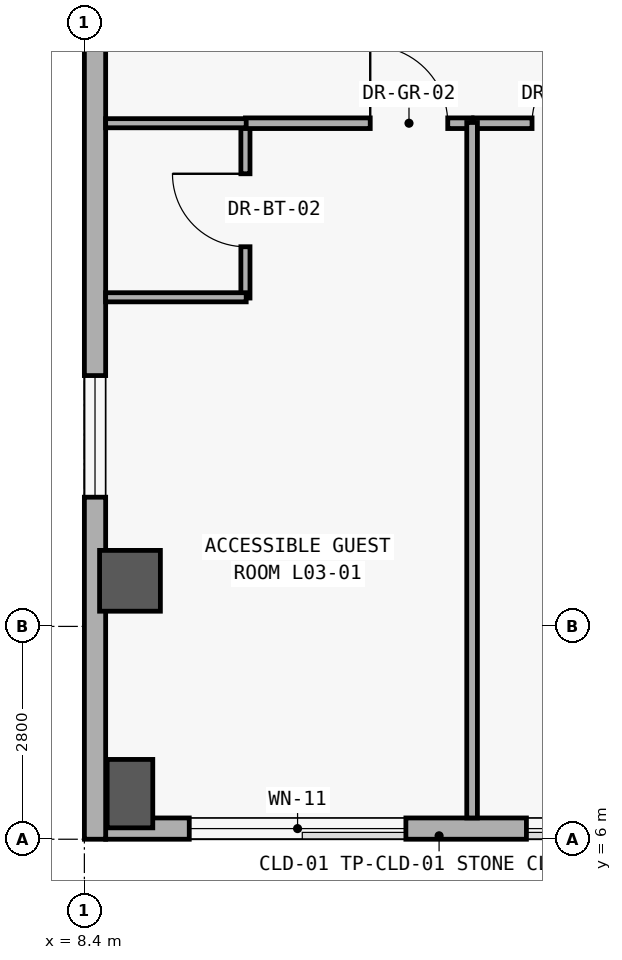
"""IFC4 building model, lengths in metres.
Left out: names, types, materials, properties, quantities, classifications, styles, units other than length and angle.
Written with IfcOpenShell. Run it as: python <this file> out.ifc"""

import sys

from ifc_helpers import new_model, si_unit, direction, frame, frame_2d, origin, origin_2d, place, context, subcontext, project, spatial, rectangle, extrude, element, fill, save


model = new_model("IFC4")
c1 = context("Model", 3, precision=1e-05, world=origin(), true_north=direction((0.0, 1.0)))
c2 = subcontext(c1, "Body", "Model", "MODEL_VIEW")
j1 = project(units=[si_unit("LENGTHUNIT", "METRE"), si_unit("PLANEANGLEUNIT", "RADIAN")], contexts=[c1])
p1 = place(None, origin())
s1 = spatial("IfcSite", under=j1, at=p1, CompositionType="ELEMENT")
p2 = place(p1, origin())
s2 = spatial("IfcBuilding", under=s1, at=p2, CompositionType="ELEMENT")
p3 = place(p2, frame((0.0, 0.0, 15.0)))
s3 = spatial("IfcBuildingStorey", under=s2, at=p3, CompositionType="ELEMENT", Elevation=15.0)
p4 = place(p3, frame((9.0, 6.6, 0.0), z_axis=(0.0, 0.0, 1.0), x_axis=(0.0, 1.0, 0.0)))
e1 = element("IfcColumn", 1, at=p4, inside=s3, PredefinedType="COLUMN", context=c2, shape_type="SweptSolid", body=[
    extrude(rectangle(XDim=0.6, YDim=0.9, at=origin_2d()), origin(), (0.0, 0.0, 1.0), 4.2),
])
p5 = place(p3, frame((9.0, 9.4, 0.0), z_axis=(0.0, 0.0, 1.0), x_axis=(1.0, 0.0, 0.0)))
e2 = element("IfcColumn", 2, at=p5, inside=s3, PredefinedType="COLUMN", context=c2, shape_type="SweptSolid", body=[
    extrude(rectangle(XDim=0.8, YDim=0.8, at=origin_2d()), origin(), (0.0, 0.0, 1.0), 4.2),
])
p6 = place(p3, frame((92.12, 6.14, 0.0), z_axis=(0.0, 0.0, 1.0), x_axis=(-1.0, 0.0, 0.0)))
e3 = element("IfcWall", 3, at=p6, inside=s3, PredefinedType="SOLIDWALL", context=c2, shape_type="SweptSolid", body=[
    extrude(rectangle(XDim=83.44, YDim=0.28, at=frame_2d((41.72, 0.0))), origin(), (0.0, 0.0, 1.0), 3.92),
])
p7 = place(p6, frame((79.49, 0.0, 0.85)))
e4 = element("IfcOpeningElement", 4, at=p7, cuts=e3, PredefinedType="OPENING", context=c2, shape_type="SweptSolid", body=[
    extrude(rectangle(XDim=2.85, YDim=1.85, at=frame_2d((1.425, 0.925))), frame((0.0, 0.15, 0.0), z_axis=(0.0, -1.0, 0.0), x_axis=(1.0, 0.0, 0.0)), (0.0, 0.0, 1.0), 0.3),
])
p8 = place(p6, frame((74.704, 0.0, 0.85)))
e5 = element("IfcOpeningElement", 5, at=p8, cuts=e3, PredefinedType="OPENING", context=c2, shape_type="SweptSolid", body=[
    extrude(rectangle(XDim=3.2, YDim=1.95, at=frame_2d((1.6, 0.975))), frame((0.0, 0.15, 0.0), z_axis=(0.0, -1.0, 0.0), x_axis=(1.0, 0.0, 0.0)), (0.0, 0.0, 1.0), 0.3),
])
p9 = place(p6, frame((69.942, 0.0, 0.85)))
e6 = element("IfcOpeningElement", 6, at=p9, cuts=e3, PredefinedType="OPENING", context=c2, shape_type="SweptSolid", body=[
    extrude(rectangle(XDim=3.5, YDim=2.0, at=frame_2d((1.75, 1.0))), frame((0.0, 0.15, 0.0), z_axis=(0.0, -1.0, 0.0), x_axis=(1.0, 0.0, 0.0)), (0.0, 0.0, 1.0), 0.3),
])
p10 = place(p6, frame((66.382, 0.0, 0.85)))
e7 = element("IfcOpeningElement", 7, at=p10, cuts=e3, PredefinedType="OPENING", context=c2, shape_type="SweptSolid", body=[
    extrude(rectangle(XDim=1.4, YDim=1.6, at=frame_2d((0.7, 0.8))), frame((0.0, 0.15, 0.0), z_axis=(0.0, -1.0, 0.0), x_axis=(1.0, 0.0, 0.0)), (0.0, 0.0, 1.0), 0.3),
])
p11 = place(p6, frame((61.67, 0.0, 0.85)))
e8 = element("IfcOpeningElement", 8, at=p11, cuts=e3, PredefinedType="OPENING", context=c2, shape_type="SweptSolid", body=[
    extrude(rectangle(XDim=1.6, YDim=1.6, at=frame_2d((0.8, 0.8))), frame((0.0, 0.15, 0.0), z_axis=(0.0, -1.0, 0.0), x_axis=(1.0, 0.0, 0.0)), (0.0, 0.0, 1.0), 0.3),
])
p12 = place(p6, frame((56.959, 0.0, 0.85)))
e9 = element("IfcOpeningElement", 9, at=p12, cuts=e3, PredefinedType="OPENING", context=c2, shape_type="SweptSolid", body=[
    extrude(rectangle(XDim=1.8, YDim=1.6, at=frame_2d((0.9, 0.8))), frame((0.0, 0.15, 0.0), z_axis=(0.0, -1.0, 0.0), x_axis=(1.0, 0.0, 0.0)), (0.0, 0.0, 1.0), 0.3),
])
p13 = place(p6, frame((52.248, 0.0, 0.85)))
e10 = element("IfcOpeningElement", 10, at=p13, cuts=e3, PredefinedType="OPENING", context=c2, shape_type="SweptSolid", body=[
    extrude(rectangle(XDim=2.0, YDim=1.65, at=frame_2d((1.0, 0.825))), frame((0.0, 0.15, 0.0), z_axis=(0.0, -1.0, 0.0), x_axis=(1.0, 0.0, 0.0)), (0.0, 0.0, 1.0), 0.3),
])
p14 = place(p6, frame((47.536, 0.0, 0.85)))
e11 = element("IfcOpeningElement", 11, at=p14, cuts=e3, PredefinedType="OPENING", context=c2, shape_type="SweptSolid", body=[
    extrude(rectangle(XDim=2.2, YDim=1.65, at=frame_2d((1.1, 0.825))), frame((0.0, 0.15, 0.0), z_axis=(0.0, -1.0, 0.0), x_axis=(1.0, 0.0, 0.0)), (0.0, 0.0, 1.0), 0.3),
])
p15 = place(p6, frame((42.726, 0.0, 0.85)))
e12 = element("IfcOpeningElement", 12, at=p15, cuts=e3, PredefinedType="OPENING", context=c2, shape_type="SweptSolid", body=[
    extrude(rectangle(XDim=2.6, YDim=2.2, at=frame_2d((1.3, 1.1))), frame((0.0, 0.15, 0.0), z_axis=(0.0, -1.0, 0.0), x_axis=(1.0, 0.0, 0.0)), (0.0, 0.0, 1.0), 0.3),
])
p16 = place(p6, frame((37.865, 0.0, 0.85)))
e13 = element("IfcOpeningElement", 13, at=p16, cuts=e3, PredefinedType="OPENING", context=c2, shape_type="SweptSolid", body=[
    extrude(rectangle(XDim=3.1, YDim=2.2, at=frame_2d((1.55, 1.1))), frame((0.0, 0.15, 0.0), z_axis=(0.0, -1.0, 0.0), x_axis=(1.0, 0.0, 0.0)), (0.0, 0.0, 1.0), 0.3),
])
p17 = place(p6, frame((33.004, 0.0, 0.85)))
e14 = element("IfcOpeningElement", 14, at=p17, cuts=e3, PredefinedType="OPENING", context=c2, shape_type="SweptSolid", body=[
    extrude(rectangle(XDim=3.6, YDim=2.3, at=frame_2d((1.8, 1.15))), frame((0.0, 0.15, 0.0), z_axis=(0.0, -1.0, 0.0), x_axis=(1.0, 0.0, 0.0)), (0.0, 0.0, 1.0), 0.3),
])
p18 = place(p6, frame((29.568, 0.0, 0.85)))
e15 = element("IfcOpeningElement", 15, at=p18, cuts=e3, PredefinedType="OPENING", context=c2, shape_type="SweptSolid", body=[
    extrude(rectangle(XDim=1.25, YDim=1.45, at=frame_2d((0.625, 0.725))), frame((0.0, 0.15, 0.0), z_axis=(0.0, -1.0, 0.0), x_axis=(1.0, 0.0, 0.0)), (0.0, 0.0, 1.0), 0.3),
])
p19 = place(p6, frame((24.907, 0.0, 0.85)))
e16 = element("IfcOpeningElement", 16, at=p19, cuts=e3, PredefinedType="OPENING", context=c2, shape_type="SweptSolid", body=[
    extrude(rectangle(XDim=1.35, YDim=1.55, at=frame_2d((0.675, 0.775))), frame((0.0, 0.15, 0.0), z_axis=(0.0, -1.0, 0.0), x_axis=(1.0, 0.0, 0.0)), (0.0, 0.0, 1.0), 0.3),
])
p20 = place(p6, frame((20.245, 0.0, 0.85)))
e17 = element("IfcOpeningElement", 17, at=p20, cuts=e3, PredefinedType="OPENING", context=c2, shape_type="SweptSolid", body=[
    extrude(rectangle(XDim=1.45, YDim=1.65, at=frame_2d((0.725, 0.825))), frame((0.0, 0.15, 0.0), z_axis=(0.0, -1.0, 0.0), x_axis=(1.0, 0.0, 0.0)), (0.0, 0.0, 1.0), 0.3),
])
p21 = place(p6, frame((15.584, 0.0, 0.85)))
e18 = element("IfcOpeningElement", 18, at=p21, cuts=e3, PredefinedType="OPENING", context=c2, shape_type="SweptSolid", body=[
    extrude(rectangle(XDim=1.55, YDim=1.65, at=frame_2d((0.775, 0.825))), frame((0.0, 0.15, 0.0), z_axis=(0.0, -1.0, 0.0), x_axis=(1.0, 0.0, 0.0)), (0.0, 0.0, 1.0), 0.3),
])
p22 = place(p6, frame((10.898, 0.0, 0.85)))
e19 = element("IfcOpeningElement", 19, at=p22, cuts=e3, PredefinedType="OPENING", context=c2, shape_type="SweptSolid", body=[
    extrude(rectangle(XDim=1.7, YDim=2.0, at=frame_2d((0.85, 1.0))), frame((0.0, 0.15, 0.0), z_axis=(0.0, -1.0, 0.0), x_axis=(1.0, 0.0, 0.0)), (0.0, 0.0, 1.0), 0.3),
])
p23 = place(p6, frame((5.987, 0.0, 0.85)))
e20 = element("IfcOpeningElement", 20, at=p23, cuts=e3, PredefinedType="OPENING", context=c2, shape_type="SweptSolid", body=[
    extrude(rectangle(XDim=2.3, YDim=2.05, at=frame_2d((1.15, 1.025))), frame((0.0, 0.15, 0.0), z_axis=(0.0, -1.0, 0.0), x_axis=(1.0, 0.0, 0.0)), (0.0, 0.0, 1.0), 0.3),
])
p24 = place(p6, frame((1.151, 0.0, 0.85)))
e21 = element("IfcOpeningElement", 21, at=p24, cuts=e3, PredefinedType="OPENING", context=c2, shape_type="SweptSolid", body=[
    extrude(rectangle(XDim=2.75, YDim=2.1, at=frame_2d((1.375, 1.05))), frame((0.0, 0.15, 0.0), z_axis=(0.0, -1.0, 0.0), x_axis=(1.0, 0.0, 0.0)), (0.0, 0.0, 1.0), 0.3),
])
p25 = place(p3, frame((8.54, 6.0, 0.0), z_axis=(0.0, 0.0, 1.0), x_axis=(0.0, 1.0, 0.0)))
e22 = element("IfcWall", 22, at=p25, inside=s3, PredefinedType="SOLIDWALL", context=c2, shape_type="SweptSolid", body=[
    extrude(rectangle(XDim=28.0, YDim=0.28, at=frame_2d((14.0, 0.0))), origin(), (0.0, 0.0, 1.0), 3.92),
])
p26 = place(p25, frame((4.5, 0.0, 0.95)))
e23 = element("IfcOpeningElement", 23, at=p26, cuts=e22, PredefinedType="OPENING", context=c2, shape_type="SweptSolid", body=[
    extrude(rectangle(XDim=1.6, YDim=1.6, at=frame_2d((0.8, 0.8))), frame((0.0, 0.15, 0.0), z_axis=(0.0, -1.0, 0.0), x_axis=(1.0, 0.0, 0.0)), (0.0, 0.0, 1.0), 0.3),
])
p27 = place(p3, frame((10.519, 13.12, 0.0), z_axis=(0.0, 0.0, 1.0), x_axis=(0.0, 1.0, 0.0)))
e24 = element("IfcWall", 24, at=p27, inside=s3, PredefinedType="PARTITIONING", context=c2, shape_type="SweptSolid", body=[
    extrude(rectangle(XDim=2.31, YDim=0.12, at=frame_2d((1.155, 0.0))), origin(), (0.0, 0.0, 1.0), 3.02),
])
p28 = place(p27, frame((0.675, 0.0, 0.0)))
e25 = element("IfcOpeningElement", 25, at=p28, cuts=e24, PredefinedType="OPENING", context=c2, shape_type="SweptSolid", body=[
    extrude(rectangle(XDim=0.96, YDim=2.15, at=frame_2d((0.48, 1.075))), frame((0.0, 0.07, 0.0), z_axis=(0.0, -1.0, 0.0), x_axis=(1.0, 0.0, 0.0)), (0.0, 0.0, 1.0), 0.14),
])
p29 = place(p3, frame((10.519, 15.42, 0.0), z_axis=(0.0, 0.0, 1.0), x_axis=(1.0, 0.0, 0.0)))
e26 = element("IfcWall", 26, at=p29, inside=s3, PredefinedType="PARTITIONING", context=c2, shape_type="SweptSolid", body=[
    extrude(rectangle(XDim=2.982, YDim=0.14, at=frame_2d((1.491, 0.0))), origin(), (0.0, 0.0, 1.0), 3.02),
])
p30 = place(p29, frame((1.642, 0.0, 0.0)))
e27 = element("IfcOpeningElement", 27, at=p30, cuts=e26, PredefinedType="OPENING", context=c2, shape_type="SweptSolid", body=[
    extrude(rectangle(XDim=1.02, YDim=2.2, at=frame_2d((0.51, 1.1))), frame((0.0, 0.08, 0.0), z_axis=(0.0, -1.0, 0.0), x_axis=(1.0, 0.0, 0.0)), (0.0, 0.0, 1.0), 0.16),
])
p31 = place(p3, frame((13.521, 15.42, 0.0), z_axis=(0.0, 0.0, 1.0), x_axis=(1.0, 0.0, 0.0)))
e28 = element("IfcWall", 28, at=p31, inside=s3, PredefinedType="PARTITIONING", context=c2, shape_type="SweptSolid", body=[
    extrude(rectangle(XDim=2.982, YDim=0.14, at=frame_2d((1.491, 0.0))), origin(), (0.0, 0.0, 1.0), 3.02),
])
p32 = place(p31, frame((0.769, 0.0, 0.0)))
e29 = element("IfcOpeningElement", 29, at=p32, cuts=e28, PredefinedType="OPENING", context=c2, shape_type="SweptSolid", body=[
    extrude(rectangle(XDim=0.94, YDim=2.2, at=frame_2d((0.47, 1.1))), frame((0.0, 0.08, 0.0), z_axis=(0.0, -1.0, 0.0), x_axis=(1.0, 0.0, 0.0)), (0.0, 0.0, 1.0), 0.16),
])
for number, where, z_axis, x_axis in (
    (30, (8.68, 13.13, 0.0), (0.0, 0.0, 1.0), (1.0, 0.0, 0.0)),
    (31, (8.68, 15.42, 0.0), (0.0, 0.0, 1.0), (1.0, 0.0, 0.0)),
):
    element("IfcWall", number, at=place(p3, frame(where, z_axis=z_axis, x_axis=x_axis)), inside=s3, PredefinedType="PARTITIONING", context=c2, shape_type="SweptSolid", body=[
        extrude(rectangle(XDim=1.849, YDim=0.12, at=frame_2d((0.925, 0.0))), origin(), (0.0, 0.0, 1.0), 3.02),
    ])
p33 = place(p3, frame((13.501, 6.28, 0.0), z_axis=(0.0, 0.0, 1.0), x_axis=(0.0, 1.0, 0.0)))
e32 = element("IfcWall", 32, at=p33, inside=s3, PredefinedType="PARTITIONING", context=c2, shape_type="SweptSolid", body=[
    extrude(rectangle(XDim=9.15, YDim=0.14, at=frame_2d((4.575, 0.0))), origin(), (0.0, 0.0, 1.0), 3.02),
])
p34 = place(p7, origin())
e33 = element("IfcWindow", 33, at=p34, inside=s3, PartitioningType="SINGLE_PANEL", PredefinedType="WINDOW", context=c2, shape_type="SweptSolid", body=[
    extrude(rectangle(XDim=2.85, YDim=1.85, at=frame_2d((1.425, 0.925))), frame((0.0, 0.03, 0.0), z_axis=(0.0, -1.0, 0.0), x_axis=(1.0, 0.0, 0.0)), (0.0, 0.0, 1.0), 0.06),
])
fill(e4, e33)
p35 = place(p8, origin())
e34 = element("IfcWindow", 34, at=p35, inside=s3, PartitioningType="SINGLE_PANEL", PredefinedType="WINDOW", context=c2, shape_type="SweptSolid", body=[
    extrude(rectangle(XDim=3.2, YDim=1.95, at=frame_2d((1.6, 0.975))), frame((0.0, 0.03, 0.0), z_axis=(0.0, -1.0, 0.0), x_axis=(1.0, 0.0, 0.0)), (0.0, 0.0, 1.0), 0.06),
])
fill(e5, e34)
p36 = place(p26, origin())
e35 = element("IfcWindow", 35, at=p36, inside=s3, PartitioningType="SINGLE_PANEL", PredefinedType="WINDOW", context=c2, shape_type="SweptSolid", body=[
    extrude(rectangle(XDim=1.6, YDim=1.6, at=frame_2d((0.8, 0.8))), frame((0.0, 0.03, 0.0), z_axis=(0.0, -1.0, 0.0), x_axis=(1.0, 0.0, 0.0)), (0.0, 0.0, 1.0), 0.06),
])
fill(e23, e35)
p37 = place(p28, origin())
e36 = element("IfcDoor", 36, at=p37, inside=s3, OperationType="SINGLE_SWING_RIGHT", PredefinedType="DOOR", context=c2, shape_type="SweptSolid", body=[
    extrude(rectangle(XDim=0.96, YDim=2.15, at=frame_2d((0.48, 1.075))), frame((0.0, 0.025, 0.0), z_axis=(0.0, -1.0, 0.0), x_axis=(1.0, 0.0, 0.0)), (0.0, 0.0, 1.0), 0.05),
])
fill(e25, e36)
p38 = place(p30, origin())
e37 = element("IfcDoor", 37, at=p38, inside=s3, OperationType="SINGLE_SWING_LEFT", PredefinedType="DOOR", context=c2, shape_type="SweptSolid", body=[
    extrude(rectangle(XDim=1.02, YDim=2.2, at=frame_2d((0.51, 1.1))), frame((0.0, 0.025, 0.0), z_axis=(0.0, -1.0, 0.0), x_axis=(1.0, 0.0, 0.0)), (0.0, 0.0, 1.0), 0.05),
])
fill(e27, e37)
p39 = place(p32, origin())
e38 = element("IfcDoor", 38, at=p39, inside=s3, OperationType="SINGLE_SWING_RIGHT", PredefinedType="DOOR", context=c2, shape_type="SweptSolid", body=[
    extrude(rectangle(XDim=0.94, YDim=2.2, at=frame_2d((0.47, 1.1))), frame((0.0, 0.025, 0.0), z_axis=(0.0, -1.0, 0.0), x_axis=(1.0, 0.0, 0.0)), (0.0, 0.0, 1.0), 0.05),
])
fill(e29, e38)
save(model, sys.argv[1])
